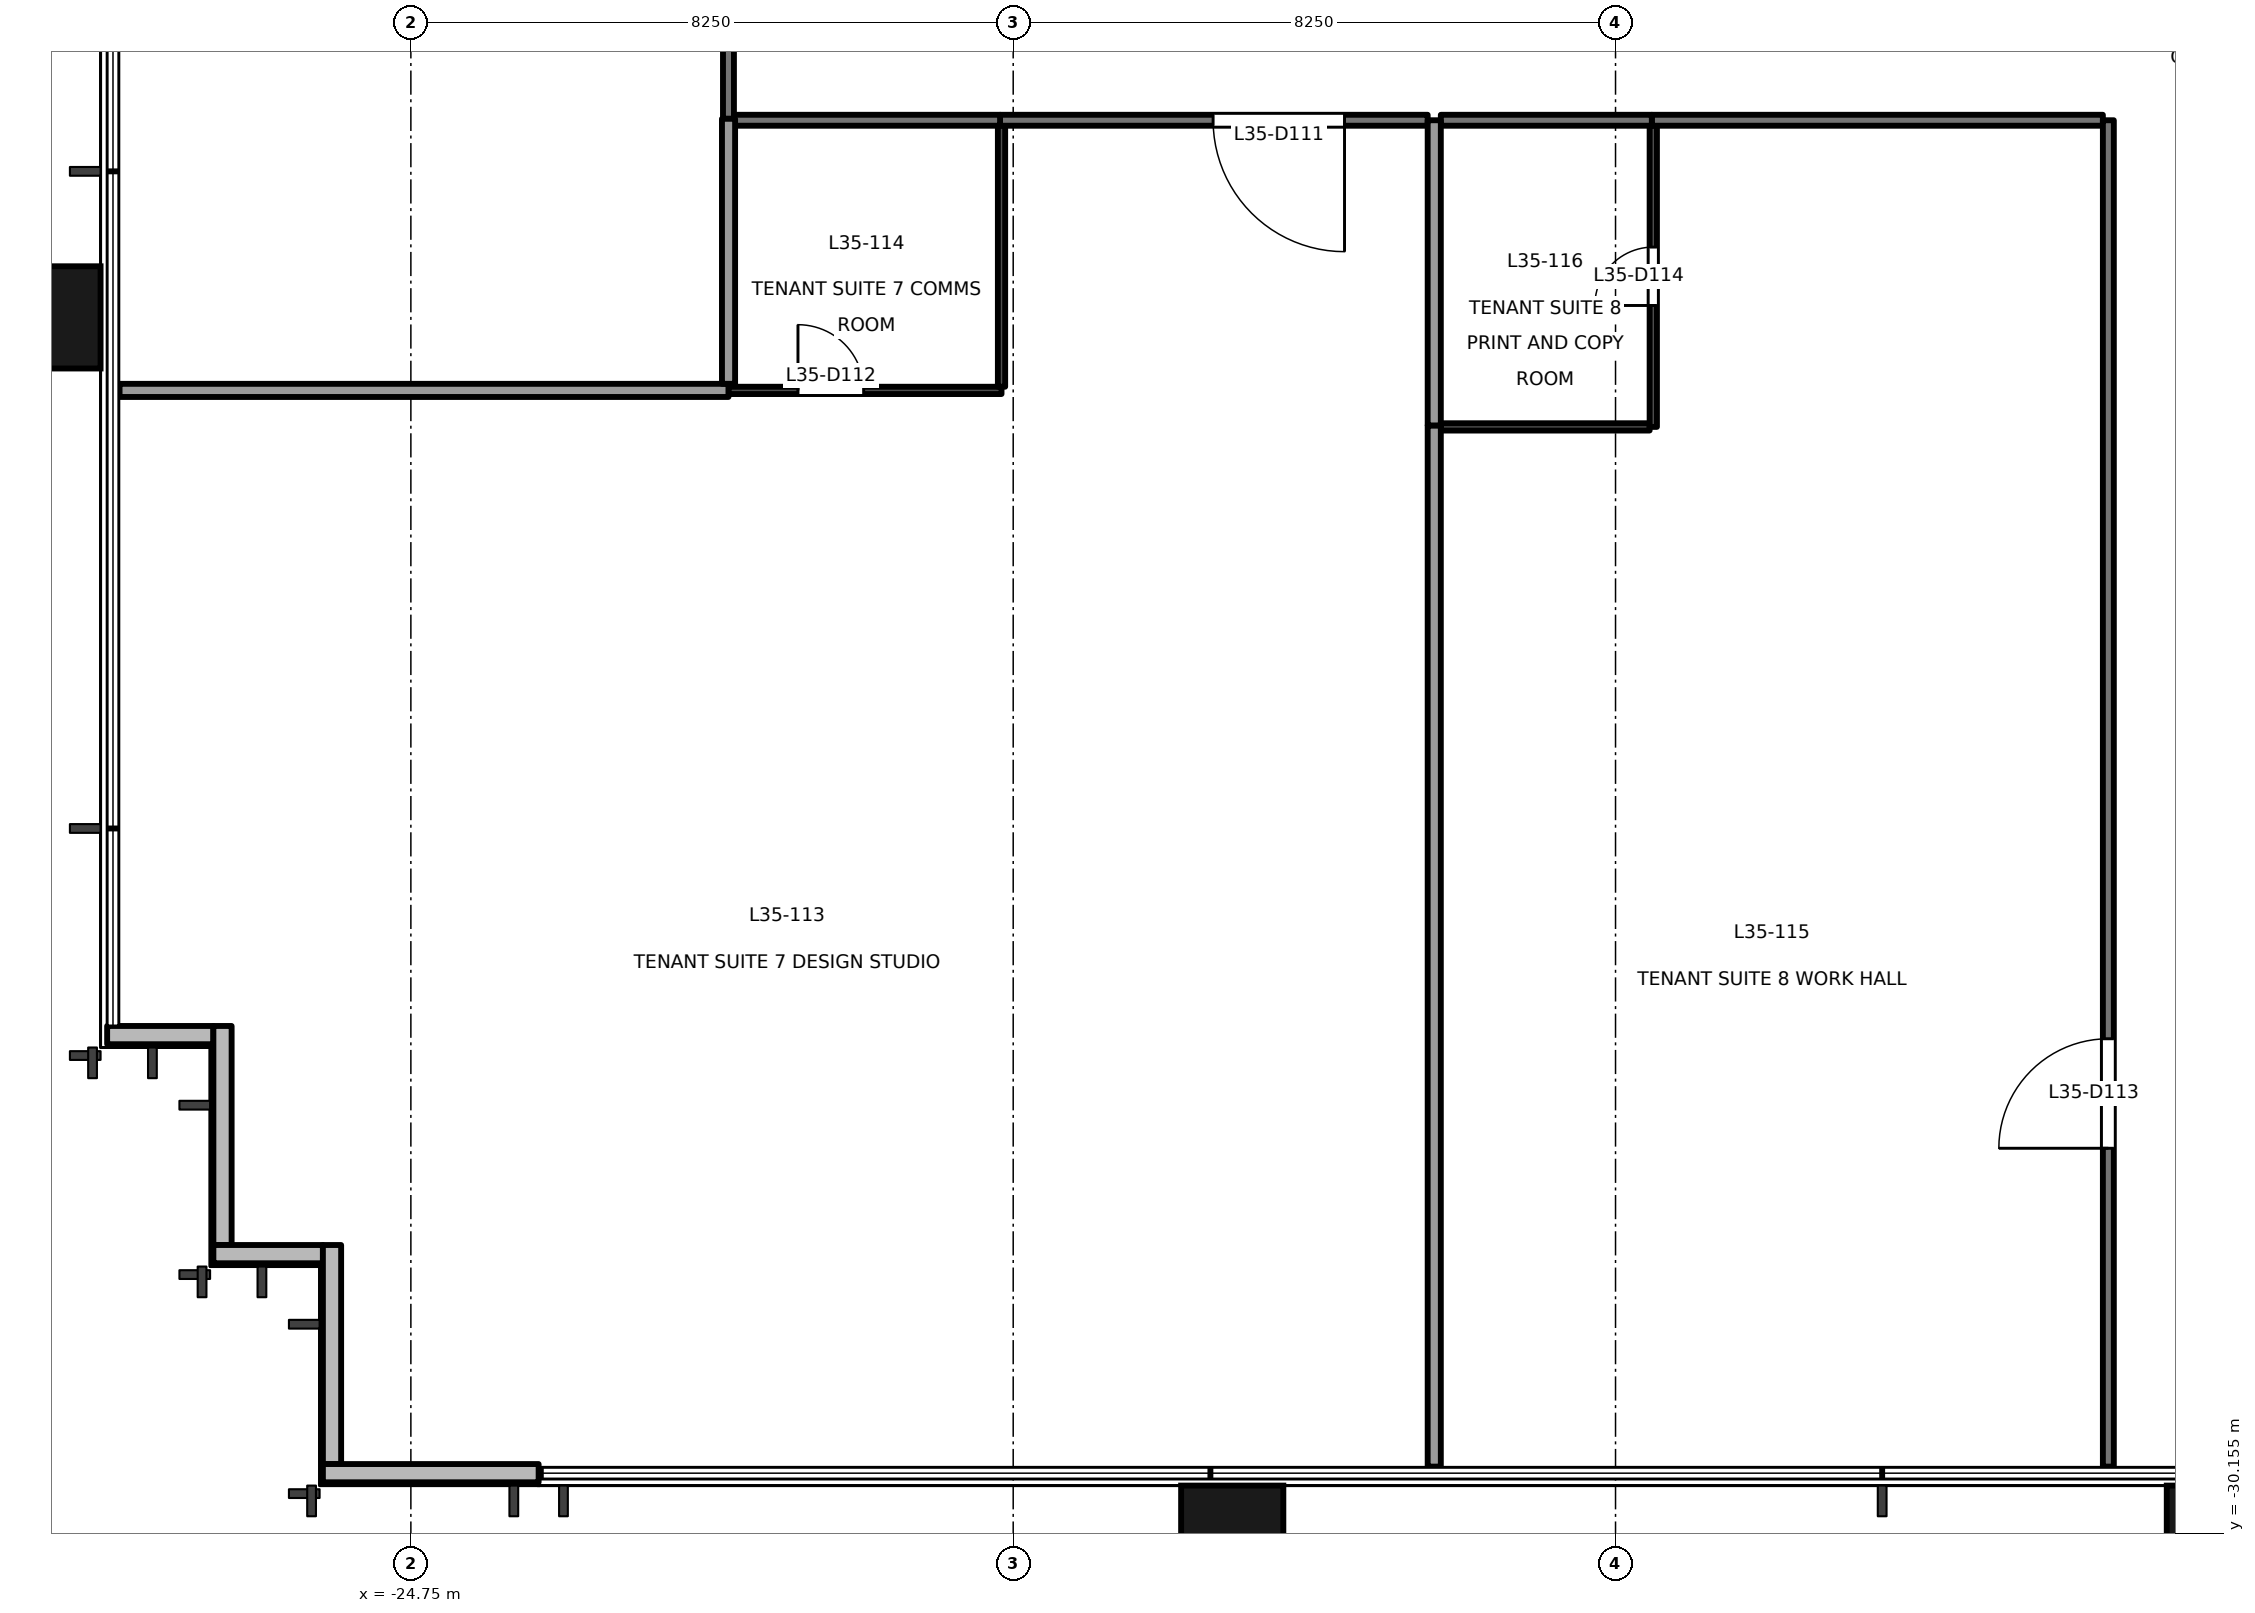
"""IFC4 building model, lengths in metres.
Left out: names, types, materials, properties, quantities, classifications, styles, units other than length and angle.
Written with IfcOpenShell. Run it as: python <this file> out.ifc"""

import sys

from ifc_helpers import new_model, si_unit, direction, frame, frame_2d, origin, origin_2d, place, context, subcontext, project, spatial, rectangle, extrude, element, fill, save


model = new_model("IFC4")
c1 = context("Model", 3, precision=1e-05, world=origin(), true_north=direction((0.0, 1.0)))
c2 = subcontext(c1, "Body", "Model", "MODEL_VIEW")
j1 = project(units=[si_unit("LENGTHUNIT", "METRE"), si_unit("PLANEANGLEUNIT", "RADIAN")], contexts=[c1])
p1 = place(None, origin())
s1 = spatial("IfcSite", under=j1, at=p1, CompositionType="ELEMENT")
p2 = place(p1, origin())
s2 = spatial("IfcBuilding", under=s1, at=p2, CompositionType="ELEMENT")
p3 = place(p2, frame((0.0, 0.0, 154.1)))
s3 = spatial("IfcBuildingStorey", under=s2, at=p3, CompositionType="ELEMENT", Elevation=154.1)
for number, where, z_axis, x_axis in (
    (1, (-13.5, -30.4, -0.2), (0.0, 0.0, 1.0), (1.0, 0.0, 0.0)),
    (2, (0.0, -30.4, -0.2), (0.0, 0.0, 1.0), (1.0, 0.0, 0.0)),
    (3, (-29.9, -13.5, -0.2), (0.0, 0.0, 1.0), (0.0, 1.0, 0.0)),
):
    element("IfcColumn", number, at=place(p3, frame(where, z_axis=z_axis, x_axis=x_axis)), inside=s3, PredefinedType="COLUMN", context=c2, shape_type="SweptSolid", body=[
        extrude(rectangle(XDim=1.4, YDim=1.8, at=origin_2d()), origin(), (0.0, 0.0, 1.0), 4.0),
    ])
p4 = place(p3, frame((-28.91, -23.33, 0.0), z_axis=(0.0, 0.0, 1.0), x_axis=(1.0, 0.0, 0.0)))
e4 = element("IfcWall", 4, at=p4, inside=s3, PredefinedType="SOLIDWALL", context=c2, shape_type="SweptSolid", body=[
    extrude(rectangle(XDim=1.455, YDim=0.25, at=frame_2d((0.728, 0.0))), origin(), (0.0, 0.0, 1.0), 3.8),
])
p5 = place(p3, frame((-27.33, -23.205, 0.0), z_axis=(0.0, 0.0, 1.0), x_axis=(0.0, -1.0, 0.0)))
e5 = element("IfcWall", 5, at=p5, inside=s3, PredefinedType="SOLIDWALL", context=c2, shape_type="SweptSolid", body=[
    extrude(rectangle(XDim=3.0, YDim=0.25, at=frame_2d((1.5, 0.0))), origin(), (0.0, 0.0, 1.0), 3.8),
])
p6 = place(p3, frame((-27.455, -26.33, 0.0), z_axis=(0.0, 0.0, 1.0), x_axis=(1.0, 0.0, 0.0)))
e6 = element("IfcWall", 6, at=p6, inside=s3, PredefinedType="SOLIDWALL", context=c2, shape_type="SweptSolid", body=[
    extrude(rectangle(XDim=1.5, YDim=0.25, at=frame_2d((0.75, 0.0))), origin(), (0.0, 0.0, 1.0), 3.8),
])
p7 = place(p3, frame((-25.83, -26.205, 0.0), z_axis=(0.0, 0.0, 1.0), x_axis=(0.0, -1.0, 0.0)))
e7 = element("IfcWall", 7, at=p7, inside=s3, PredefinedType="SOLIDWALL", context=c2, shape_type="SweptSolid", body=[
    extrude(rectangle(XDim=3.0, YDim=0.25, at=frame_2d((1.5, 0.0))), origin(), (0.0, 0.0, 1.0), 3.8),
])
p8 = place(p3, frame((-25.955, -29.33, 0.0), z_axis=(0.0, 0.0, 1.0), x_axis=(1.0, 0.0, 0.0)))
e8 = element("IfcWall", 8, at=p8, inside=s3, PredefinedType="SOLIDWALL", context=c2, shape_type="SweptSolid", body=[
    extrude(rectangle(XDim=2.955, YDim=0.25, at=frame_2d((1.478, 0.0))), origin(), (0.0, 0.0, 1.0), 3.8),
])
p9 = place(p3, frame((-20.4, -10.78, 0.0), z_axis=(0.0, 0.0, 1.0), x_axis=(0.0, 1.0, 0.0)))
e9 = element("IfcWall", 9, at=p9, inside=s3, PredefinedType="PARTITIONING", context=c2, shape_type="SweptSolid", body=[
    extrude(rectangle(XDim=8.19, YDim=0.15, at=frame_2d((4.095, 0.0))), origin(), (0.0, 0.0, 1.0), 3.3),
])
p10 = place(p9, frame((3.645, 0.0, 0.0)))
e10 = element("IfcOpeningElement", 10, at=p10, cuts=e9, PredefinedType="OPENING", context=c2, shape_type="SweptSolid", body=[
    extrude(rectangle(XDim=0.9, YDim=2.1, at=frame_2d((0.45, 1.05))), frame((0.0, 0.085, 0.0), z_axis=(0.0, -1.0, 0.0), x_axis=(1.0, 0.0, 0.0)), (0.0, 0.0, 1.0), 0.171),
])
p11 = place(p3, frame((-10.823, -10.8, 0.0), z_axis=(0.0, 0.0, 1.0), x_axis=(-1.0, 0.0, 0.0)))
e11 = element("IfcWall", 11, at=p11, inside=s3, PredefinedType="PARTITIONING", context=c2, shape_type="SweptSolid", body=[
    extrude(rectangle(XDim=5.857, YDim=0.15, at=frame_2d((2.928, 0.0))), origin(), (0.0, 0.0, 1.0), 2.9),
])
p12 = place(p11, frame((1.139, 0.0, 0.0)))
e12 = element("IfcOpeningElement", 12, at=p12, cuts=e11, PredefinedType="OPENING", context=c2, shape_type="SweptSolid", body=[
    extrude(rectangle(XDim=1.8, YDim=2.1, at=frame_2d((0.9, 1.05))), frame((0.0, 0.085, 0.0), z_axis=(0.0, -1.0, 0.0), x_axis=(1.0, 0.0, 0.0)), (0.0, 0.0, 1.0), 0.171),
])
p13 = place(p3, frame((-16.68, -10.8, 0.0), z_axis=(0.0, 0.0, 1.0), x_axis=(-1.0, 0.0, 0.0)))
e13 = element("IfcWall", 13, at=p13, inside=s3, PredefinedType="PARTITIONING", context=c2, shape_type="SweptSolid", body=[
    extrude(rectangle(XDim=3.645, YDim=0.15, at=frame_2d((1.823, 0.0))), origin(), (0.0, 0.0, 1.0), 3.8),
])
p14 = place(p3, frame((-1.575, -10.8, 0.0), z_axis=(0.0, 0.0, 1.0), x_axis=(-1.0, 0.0, 0.0)))
e14 = element("IfcWall", 14, at=p14, inside=s3, PredefinedType="PARTITIONING", context=c2, shape_type="SweptSolid", body=[
    extrude(rectangle(XDim=6.178, YDim=0.15, at=frame_2d((3.089, 0.0))), origin(), (0.0, 0.0, 1.0), 2.9),
])
p15 = place(p3, frame((-1.5, -29.24, 0.0), z_axis=(0.0, 0.0, 1.0), x_axis=(0.0, 1.0, 0.0)))
e15 = element("IfcWall", 15, at=p15, inside=s3, PredefinedType="PARTITIONING", context=c2, shape_type="SweptSolid", body=[
    extrude(rectangle(XDim=18.44, YDim=0.15, at=frame_2d((9.22, 0.0))), origin(), (0.0, 0.0, 1.0), 3.8),
])
p16 = place(p15, frame((4.36, 0.0, 0.0)))
e16 = element("IfcOpeningElement", 16, at=p16, cuts=e15, PredefinedType="OPENING", context=c2, shape_type="SweptSolid", body=[
    extrude(rectangle(XDim=1.5, YDim=2.1, at=frame_2d((0.75, 1.05))), frame((0.0, 0.085, 0.0), z_axis=(0.0, -1.0, 0.0), x_axis=(1.0, 0.0, 0.0)), (0.0, 0.0, 1.0), 0.171),
])
p17 = place(p3, frame((-7.753, -10.8, 0.0), z_axis=(0.0, 0.0, 1.0), x_axis=(-1.0, 0.0, 0.0)))
e17 = element("IfcWall", 17, at=p17, inside=s3, PredefinedType="PARTITIONING", context=c2, shape_type="SweptSolid", body=[
    extrude(rectangle(XDim=2.89, YDim=0.15, at=frame_2d((1.445, 0.0))), origin(), (0.0, 0.0, 1.0), 2.9),
])
p18 = place(p3, frame((-20.4, -14.5, 0.0), z_axis=(0.0, 0.0, 1.0), x_axis=(-1.0, 0.0, 0.0)))
e18 = element("IfcWall", 18, at=p18, inside=s3, PredefinedType="PARTITIONING", context=c2, shape_type="SweptSolid", body=[
    extrude(rectangle(XDim=8.34, YDim=0.18, at=frame_2d((4.17, 0.0))), origin(), (0.0, 0.0, 1.0), 3.8),
])
p19 = place(p3, frame((-20.399, -10.78, 0.0), z_axis=(0.0, 0.0, 1.0), x_axis=(0.0, -1.0, 0.0)))
e19 = element("IfcWall", 19, at=p19, inside=s3, PredefinedType="PARTITIONING", context=c2, shape_type="SweptSolid", body=[
    extrude(rectangle(XDim=3.63, YDim=0.18, at=frame_2d((1.815, 0.0))), origin(), (0.0, 0.0, 1.0), 3.8),
])
p20 = place(p3, frame((-20.4, -14.5, 0.0), z_axis=(0.0, 0.0, 1.0), x_axis=(1.0, 0.0, 0.0)))
e20 = element("IfcWall", 20, at=p20, inside=s3, PredefinedType="PARTITIONING", context=c2, shape_type="SweptSolid", body=[
    extrude(rectangle(XDim=3.74, YDim=0.1, at=frame_2d((1.87, 0.0))), origin(), (0.0, 0.0, 1.0), 3.8),
])
p21 = place(p20, frame((0.952, 0.0, 0.0)))
e21 = element("IfcOpeningElement", 21, at=p21, cuts=e20, PredefinedType="OPENING", context=c2, shape_type="SweptSolid", body=[
    extrude(rectangle(XDim=0.9, YDim=2.1, at=frame_2d((0.45, 1.05))), frame((0.0, 0.061, 0.0), z_axis=(0.0, -1.0, 0.0), x_axis=(1.0, 0.0, 0.0)), (0.0, 0.0, 1.0), 0.121),
])
p22 = place(p3, frame((-16.66, -14.45, 0.0), z_axis=(0.0, 0.0, 1.0), x_axis=(0.0, 1.0, 0.0)))
e22 = element("IfcWall", 22, at=p22, inside=s3, PredefinedType="PARTITIONING", context=c2, shape_type="SweptSolid", body=[
    extrude(rectangle(XDim=3.575, YDim=0.1, at=frame_2d((1.788, 0.0))), origin(), (0.0, 0.0, 1.0), 3.8),
])
p23 = place(p3, frame((-10.733, -14.98, 0.0), z_axis=(0.0, 0.0, 1.0), x_axis=(0.0, -1.0, 0.0)))
e23 = element("IfcWall", 23, at=p23, inside=s3, PredefinedType="PARTITIONING", context=c2, shape_type="SweptSolid", body=[
    extrude(rectangle(XDim=14.26, YDim=0.18, at=frame_2d((7.13, 0.0))), origin(), (0.0, 0.0, 1.0), 3.8),
])
p24 = place(p3, frame((-10.733, -10.8, 0.0), z_axis=(0.0, 0.0, 1.0), x_axis=(0.0, -1.0, 0.0)))
e24 = element("IfcWall", 24, at=p24, inside=s3, PredefinedType="PARTITIONING", context=c2, shape_type="SweptSolid", body=[
    extrude(rectangle(XDim=4.18, YDim=0.18, at=frame_2d((2.09, 0.0))), origin(), (0.0, 0.0, 1.0), 3.8),
])
p25 = place(p3, frame((-10.643, -15.0, 0.0), z_axis=(0.0, 0.0, 1.0), x_axis=(1.0, 0.0, 0.0)))
e25 = element("IfcWall", 25, at=p25, inside=s3, PredefinedType="PARTITIONING", context=c2, shape_type="SweptSolid", body=[
    extrude(rectangle(XDim=2.86, YDim=0.1, at=frame_2d((1.43, 0.0))), origin(), (0.0, 0.0, 1.0), 2.9),
])
p26 = place(p3, frame((-7.733, -15.0, 0.0), z_axis=(0.0, 0.0, 1.0), x_axis=(0.0, 1.0, 0.0)))
e26 = element("IfcWall", 26, at=p26, inside=s3, PredefinedType="PARTITIONING", context=c2, shape_type="SweptSolid", body=[
    extrude(rectangle(XDim=4.125, YDim=0.1, at=frame_2d((2.062, 0.0))), origin(), (0.0, 0.0, 1.0), 3.8),
])
p27 = place(p26, frame((1.663, 0.0, 0.0)))
e27 = element("IfcOpeningElement", 27, at=p27, cuts=e26, PredefinedType="OPENING", context=c2, shape_type="SweptSolid", body=[
    extrude(rectangle(XDim=0.8, YDim=2.1, at=frame_2d((0.4, 1.05))), frame((0.0, 0.061, 0.0), z_axis=(0.0, -1.0, 0.0), x_axis=(1.0, 0.0, 0.0)), (0.0, 0.0, 1.0), 0.121),
])
p28 = place(p12, origin())
e28 = element("IfcDoor", 28, at=p28, inside=s3, OperationType="DOUBLE_DOOR_SINGLE_SWING", PredefinedType="DOOR", context=c2, shape_type="SweptSolid", body=[
    extrude(rectangle(XDim=1.8, YDim=2.1, at=frame_2d((0.9, 1.05))), frame((0.0, 0.025, 0.0), z_axis=(0.0, -1.0, 0.0), x_axis=(1.0, 0.0, 0.0)), (0.0, 0.0, 1.0), 0.05),
])
fill(e12, e28)
p29 = place(p21, origin())
e29 = element("IfcDoor", 29, at=p29, inside=s3, OperationType="SINGLE_SWING_LEFT", PredefinedType="DOOR", context=c2, shape_type="SweptSolid", body=[
    extrude(rectangle(XDim=0.9, YDim=2.1, at=frame_2d((0.45, 1.05))), frame((0.0, 0.025, 0.0), z_axis=(0.0, -1.0, 0.0), x_axis=(1.0, 0.0, 0.0)), (0.0, 0.0, 1.0), 0.05),
])
fill(e21, e29)
p30 = place(p16, origin())
e30 = element("IfcDoor", 30, at=p30, inside=s3, OperationType="DOUBLE_DOOR_SINGLE_SWING", PredefinedType="DOOR", context=c2, shape_type="SweptSolid", body=[
    extrude(rectangle(XDim=1.5, YDim=2.1, at=frame_2d((0.75, 1.05))), frame((0.0, 0.025, 0.0), z_axis=(0.0, -1.0, 0.0), x_axis=(1.0, 0.0, 0.0)), (0.0, 0.0, 1.0), 0.05),
])
fill(e16, e30)
p31 = place(p27, origin())
e31 = element("IfcDoor", 31, at=p31, inside=s3, OperationType="SINGLE_SWING_LEFT", PredefinedType="DOOR", context=c2, shape_type="SweptSolid", body=[
    extrude(rectangle(XDim=0.8, YDim=2.1, at=frame_2d((0.4, 1.05))), frame((0.0, 0.025, 0.0), z_axis=(0.0, -1.0, 0.0), x_axis=(1.0, 0.0, 0.0)), (0.0, 0.0, 1.0), 0.05),
])
fill(e27, e31)
save(model, sys.argv[1])
